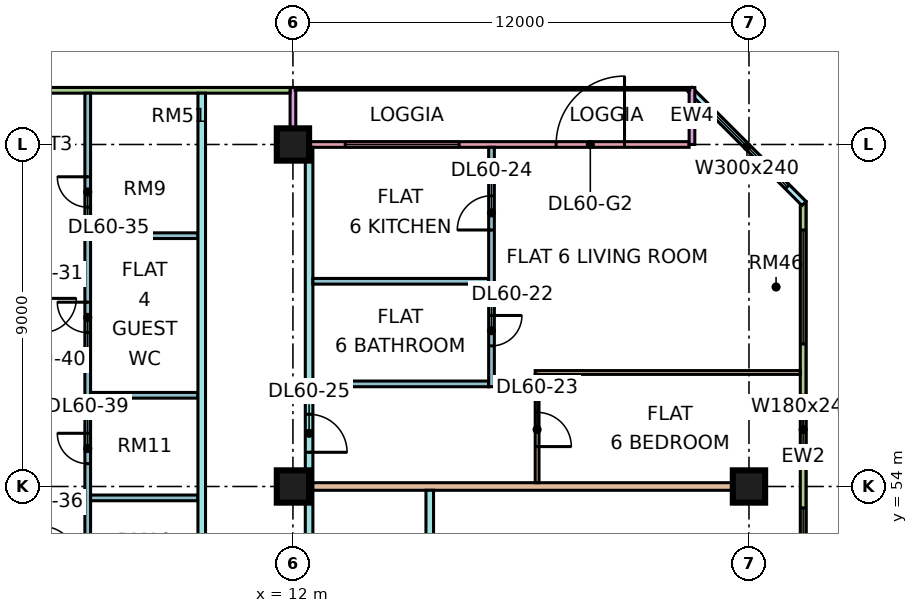
"""IFC4 building model, lengths in metres.
Left out: names, types, materials, properties, quantities, classifications, styles, units other than length and angle.
Written with IfcOpenShell. Run it as: python <this file> out.ifc"""

import sys

from ifc_helpers import new_model, si_unit, direction, frame, frame_2d, origin, origin_2d, place, context, subcontext, project, spatial, rectangle, extrude, element, fill, save


model = new_model("IFC4")
c1 = context("Model", 3, precision=1e-05, world=origin(), true_north=direction((0.0, 1.0)))
c2 = subcontext(c1, "Body", "Model", "MODEL_VIEW")
j1 = project(units=[si_unit("LENGTHUNIT", "METRE"), si_unit("PLANEANGLEUNIT", "RADIAN")], contexts=[c1])
p1 = place(None, origin())
s1 = spatial("IfcSite", under=j1, at=p1, CompositionType="ELEMENT")
p2 = place(p1, origin())
s2 = spatial("IfcBuilding", under=s1, at=p2, CompositionType="ELEMENT")
p3 = place(p2, frame((0.0, 0.0, 252.9)))
s3 = spatial("IfcBuildingStorey", under=s2, at=p3, CompositionType="ELEMENT", Elevation=252.9)
for number, where, z_axis, x_axis in (
    (1, (12.0, 54.0, 0.0), (0.0, 0.0, 1.0), (1.0, 0.0, 0.0)),
    (2, (12.0, 63.0, 0.0), (0.0, 0.0, 1.0), (1.0, 0.0, 0.0)),
    (3, (24.0, 54.0, 0.0), (0.0, 0.0, 1.0), (1.0, 0.0, 0.0)),
):
    element("IfcColumn", number, at=place(p3, frame(where, z_axis=z_axis, x_axis=x_axis)), inside=s3, PredefinedType="COLUMN", context=c2, shape_type="SweptSolid", body=[
        extrude(rectangle(XDim=0.85, YDim=0.85, at=origin_2d()), origin(), (0.0, 0.0, 1.0), 3.75),
    ])
p4 = place(p3, frame((25.425, 48.075, 0.0), z_axis=(0.0, 0.0, 1.0), x_axis=(0.0, 1.0, 0.0)))
e4 = element("IfcWall", 4, at=p4, inside=s3, PredefinedType="SOLIDWALL", context=c2, shape_type="SweptSolid", body=[
    extrude(rectangle(XDim=13.425, YDim=0.15, at=frame_2d((6.712, 0.0))), origin(), (0.0, 0.0, 1.0), 3.3),
])
p5 = place(p4, frame((0.562, 0.0, 0.45)))
e5 = element("IfcOpeningElement", 5, at=p5, cuts=e4, PredefinedType="OPENING", context=c2, shape_type="SweptSolid", body=[
    extrude(rectangle(XDim=4.8, YDim=2.4, at=frame_2d((2.4, 1.2))), frame((0.0, 0.085, 0.0), z_axis=(0.0, -1.0, 0.0), x_axis=(1.0, 0.0, 0.0)), (0.0, 0.0, 1.0), 0.17),
])
p6 = place(p4, frame((6.525, 0.0, 0.45)))
e6 = element("IfcOpeningElement", 6, at=p6, cuts=e4, PredefinedType="OPENING", context=c2, shape_type="SweptSolid", body=[
    extrude(rectangle(XDim=1.8, YDim=2.4, at=frame_2d((0.9, 1.2))), frame((0.0, 0.085, 0.0), z_axis=(0.0, -1.0, 0.0), x_axis=(1.0, 0.0, 0.0)), (0.0, 0.0, 1.0), 0.17),
])
p7 = place(p4, frame((9.675, 0.0, 0.45)))
e7 = element("IfcOpeningElement", 7, at=p7, cuts=e4, PredefinedType="OPENING", context=c2, shape_type="SweptSolid", body=[
    extrude(rectangle(XDim=3.0, YDim=2.4, at=frame_2d((1.5, 1.2))), frame((0.0, 0.085, 0.0), z_axis=(0.0, -1.0, 0.0), x_axis=(1.0, 0.0, 0.0)), (0.0, 0.0, 1.0), 0.17),
])
p8 = place(p3, frame((25.447, 61.447, 0.0), z_axis=(0.0, 0.0, 1.0), x_axis=(-0.707106781187, 0.707106781187, 0.0)))
e8 = element("IfcWall", 8, at=p8, inside=s3, PredefinedType="SOLIDWALL", context=c2, shape_type="SweptSolid", body=[
    extrude(rectangle(XDim=4.243, YDim=0.15, at=frame_2d((2.121, 0.0))), origin(), (0.0, 0.0, 1.0), 3.3),
])
p9 = place(p8, frame((0.621, 0.0, 0.45)))
e9 = element("IfcOpeningElement", 9, at=p9, cuts=e8, PredefinedType="OPENING", context=c2, shape_type="SweptSolid", body=[
    extrude(rectangle(XDim=3.0, YDim=2.4, at=frame_2d((1.5, 1.2))), frame((0.0, 0.085, 0.0), z_axis=(0.0, -1.0, 0.0), x_axis=(1.0, 0.0, 0.0)), (0.0, 0.0, 1.0), 0.17),
])
p10 = place(p3, frame((22.425, 63.0, 0.0), z_axis=(0.0, 0.0, 1.0), x_axis=(-1.0, 0.0, 0.0)))
e10 = element("IfcWall", 10, at=p10, inside=s3, PredefinedType="SOLIDWALL", context=c2, shape_type="SweptSolid", body=[
    extrude(rectangle(XDim=10.35, YDim=0.15, at=frame_2d((5.175, 0.0))), origin(), (0.0, 0.0, 1.0), 3.3),
])
p11 = place(p10, frame((1.7, 0.0, 0.0)))
e11 = element("IfcOpeningElement", 11, at=p11, cuts=e10, PredefinedType="OPENING", context=c2, shape_type="SweptSolid", body=[
    extrude(rectangle(XDim=1.8, YDim=2.4, at=frame_2d((0.9, 1.2))), frame((0.0, 0.085, 0.0), z_axis=(0.0, -1.0, 0.0), x_axis=(1.0, 0.0, 0.0)), (0.0, 0.0, 1.0), 0.17),
])
p12 = place(p10, frame((6.05, 0.0, 0.45)))
e12 = element("IfcOpeningElement", 12, at=p12, cuts=e10, PredefinedType="OPENING", context=c2, shape_type="SweptSolid", body=[
    extrude(rectangle(XDim=3.0, YDim=2.4, at=frame_2d((1.5, 1.2))), frame((0.0, 0.085, 0.0), z_axis=(0.0, -1.0, 0.0), x_axis=(1.0, 0.0, 0.0)), (0.0, 0.0, 1.0), 0.17),
])
for number, where, z_axis, x_axis in (
    (13, (22.5, 64.5, 0.0), (0.0, 0.0, 1.0), (0.0, -1.0, 0.0)),
    (14, (12.0, 64.5, 0.0), (0.0, 0.0, 1.0), (0.0, -1.0, 0.0)),
):
    element("IfcWall", number, at=place(p3, frame(where, z_axis=z_axis, x_axis=x_axis)), inside=s3, PredefinedType="SOLIDWALL", context=c2, shape_type="SweptSolid", body=[
        extrude(rectangle(XDim=1.5, YDim=0.15, at=frame_2d((0.75, 0.0))), origin(), (0.0, 0.0, 1.0), 3.3),
    ])
p13 = place(p3, frame((11.925, 64.425, 0.0), z_axis=(0.0, 0.0, 1.0), x_axis=(-1.0, 0.0, 0.0)))
e15 = element("IfcWall", 15, at=p13, inside=s3, PredefinedType="SOLIDWALL", context=c2, shape_type="SweptSolid", body=[
    extrude(rectangle(XDim=10.425, YDim=0.15, at=frame_2d((5.212, 0.0))), origin(), (0.0, 0.0, 1.0), 3.3),
])
p14 = place(p13, frame((6.675, 0.0, 0.45)))
e16 = element("IfcOpeningElement", 16, at=p14, cuts=e15, PredefinedType="OPENING", context=c2, shape_type="SweptSolid", body=[
    extrude(rectangle(XDim=3.0, YDim=2.4, at=frame_2d((1.5, 1.2))), frame((0.0, 0.085, 0.0), z_axis=(0.0, -1.0, 0.0), x_axis=(1.0, 0.0, 0.0)), (0.0, 0.0, 1.0), 0.17),
])
p15 = place(p3, frame((5.45, 63.0, 0.0), z_axis=(0.0, 0.0, 1.0), x_axis=(1.0, 0.0, 0.0)))
e17 = element("IfcWall", 17, at=p15, inside=s3, PredefinedType="PARTITIONING", context=c2, shape_type="SweptSolid", body=[
    extrude(rectangle(XDim=0.55, YDim=0.1, at=frame_2d((0.275, 0.0))), origin(), (0.0, 0.0, 1.0), 3.3),
])
p16 = place(p3, frame((6.6, 50.35, 0.0), z_axis=(0.0, 0.0, 1.0), x_axis=(0.0, 1.0, 0.0)))
e18 = element("IfcWall", 18, at=p16, inside=s3, PredefinedType="PARTITIONING", context=c2, shape_type="SweptSolid", body=[
    extrude(rectangle(XDim=14.0, YDim=0.15, at=frame_2d((7.0, 0.0))), origin(), (0.0, 0.0, 1.0), 3.3),
])
p17 = place(p16, frame((11.0, 0.0, 0.0)))
e19 = element("IfcOpeningElement", 19, at=p17, cuts=e18, PredefinedType="OPENING", context=c2, shape_type="SweptSolid", body=[
    extrude(rectangle(XDim=0.8, YDim=2.1, at=frame_2d((0.4, 1.05))), frame((0.0, 0.085, 0.0), z_axis=(0.0, -1.0, 0.0), x_axis=(1.0, 0.0, 0.0)), (0.0, 0.0, 1.0), 0.17),
])
p18 = place(p16, frame((4.25, 0.0, 0.0)))
e20 = element("IfcOpeningElement", 20, at=p18, cuts=e18, PredefinedType="OPENING", context=c2, shape_type="SweptSolid", body=[
    extrude(rectangle(XDim=0.8, YDim=2.1, at=frame_2d((0.4, 1.05))), frame((0.0, 0.085, 0.0), z_axis=(0.0, -1.0, 0.0), x_axis=(1.0, 0.0, 0.0)), (0.0, 0.0, 1.0), 0.17),
])
p19 = place(p16, frame((7.7, 0.0, 0.0)))
e21 = element("IfcOpeningElement", 21, at=p19, cuts=e18, PredefinedType="OPENING", context=c2, shape_type="SweptSolid", body=[
    extrude(rectangle(XDim=0.8, YDim=2.1, at=frame_2d((0.4, 1.05))), frame((0.0, 0.085, 0.0), z_axis=(0.0, -1.0, 0.0), x_axis=(1.0, 0.0, 0.0)), (0.0, 0.0, 1.0), 0.17),
])
for number, where, z_axis, x_axis in (
    (22, (6.675, 53.7, 0.0), (0.0, 0.0, 1.0), (1.0, 0.0, 0.0)),
    (23, (6.675, 56.4, 0.0), (0.0, 0.0, 1.0), (1.0, 0.0, 0.0)),
    (24, (6.675, 60.6, 0.0), (0.0, 0.0, 1.0), (1.0, 0.0, 0.0)),
):
    element("IfcWall", number, at=place(p3, frame(where, z_axis=z_axis, x_axis=x_axis)), inside=s3, PredefinedType="PARTITIONING", context=c2, shape_type="SweptSolid", body=[
        extrude(rectangle(XDim=2.825, YDim=0.15, at=frame_2d((1.413, 0.0))), origin(), (0.0, 0.0, 1.0), 3.3),
    ])
p20 = place(p3, frame((9.6, 20.0, 0.0), z_axis=(0.0, 0.0, 1.0), x_axis=(0.0, 1.0, 0.0)))
e25 = element("IfcWall", 25, at=p20, inside=s3, PredefinedType="PARTITIONING", context=c2, shape_type="SweptSolid", body=[
    extrude(rectangle(XDim=44.35, YDim=0.2, at=frame_2d((22.175, 0.0))), origin(), (0.0, 0.0, 1.0), 3.3),
])
p21 = place(p20, frame((28.8, 0.0, 0.0)))
e26 = element("IfcOpeningElement", 26, at=p21, cuts=e25, PredefinedType="OPENING", context=c2, shape_type="SweptSolid", body=[
    extrude(rectangle(XDim=1.0, YDim=2.1, at=frame_2d((0.5, 1.05))), frame((0.0, 0.11, 0.0), z_axis=(0.0, -1.0, 0.0), x_axis=(1.0, 0.0, 0.0)), (0.0, 0.0, 1.0), 0.22),
])
p22 = place(p20, frame((0.6, 0.0, 0.0)))
e27 = element("IfcOpeningElement", 27, at=p22, cuts=e25, PredefinedType="OPENING", context=c2, shape_type="SweptSolid", body=[
    extrude(rectangle(XDim=1.2, YDim=2.1, at=frame_2d((0.6, 1.05))), frame((0.0, 0.11, 0.0), z_axis=(0.0, -1.0, 0.0), x_axis=(1.0, 0.0, 0.0)), (0.0, 0.0, 1.0), 0.22),
])
p23 = place(p20, frame((3.9, 0.0, 0.0)))
e28 = element("IfcOpeningElement", 28, at=p23, cuts=e25, PredefinedType="OPENING", context=c2, shape_type="SweptSolid", body=[
    extrude(rectangle(XDim=1.0, YDim=2.1, at=frame_2d((0.5, 1.05))), frame((0.0, 0.11, 0.0), z_axis=(0.0, -1.0, 0.0), x_axis=(1.0, 0.0, 0.0)), (0.0, 0.0, 1.0), 0.22),
])
p24 = place(p3, frame((12.425, 20.0, 0.0), z_axis=(0.0, 0.0, 1.0), x_axis=(0.0, 1.0, 0.0)))
e29 = element("IfcWall", 29, at=p24, inside=s3, PredefinedType="PARTITIONING", context=c2, shape_type="SweptSolid", body=[
    extrude(rectangle(XDim=42.926, YDim=0.2, at=frame_2d((21.463, 0.0))), origin(), (0.0, 0.0, 1.0), 3.3),
])
p25 = place(p24, frame((7.0, 0.0, 0.0)))
e30 = element("IfcOpeningElement", 30, at=p25, cuts=e29, PredefinedType="OPENING", context=c2, shape_type="SweptSolid", body=[
    extrude(rectangle(XDim=1.0, YDim=2.1, at=frame_2d((0.5, 1.05))), frame((0.0, 0.11, 0.0), z_axis=(0.0, -1.0, 0.0), x_axis=(1.0, 0.0, 0.0)), (0.0, 0.0, 1.0), 0.22),
])
p26 = place(p24, frame((12.95, 0.0, 0.0)))
e31 = element("IfcOpeningElement", 31, at=p26, cuts=e29, PredefinedType="OPENING", context=c2, shape_type="SweptSolid", body=[
    extrude(rectangle(XDim=1.0, YDim=2.1, at=frame_2d((0.5, 1.05))), frame((0.0, 0.11, 0.0), z_axis=(0.0, -1.0, 0.0), x_axis=(1.0, 0.0, 0.0)), (0.0, 0.0, 1.0), 0.22),
])
p27 = place(p24, frame((16.75, 0.0, 0.0)))
e32 = element("IfcOpeningElement", 32, at=p27, cuts=e29, PredefinedType="OPENING", context=c2, shape_type="SweptSolid", body=[
    extrude(rectangle(XDim=1.0, YDim=2.1, at=frame_2d((0.5, 1.05))), frame((0.0, 0.11, 0.0), z_axis=(0.0, -1.0, 0.0), x_axis=(1.0, 0.0, 0.0)), (0.0, 0.0, 1.0), 0.22),
])
p28 = place(p24, frame((34.9, 0.0, 0.0)))
e33 = element("IfcOpeningElement", 33, at=p28, cuts=e29, PredefinedType="OPENING", context=c2, shape_type="SweptSolid", body=[
    extrude(rectangle(XDim=1.0, YDim=2.1, at=frame_2d((0.5, 1.05))), frame((0.0, 0.11, 0.0), z_axis=(0.0, -1.0, 0.0), x_axis=(1.0, 0.0, 0.0)), (0.0, 0.0, 1.0), 0.22),
])
p29 = place(p24, frame((1.15, 0.0, 0.0)))
e34 = element("IfcOpeningElement", 34, at=p29, cuts=e29, PredefinedType="OPENING", context=c2, shape_type="SweptSolid", body=[
    extrude(rectangle(XDim=1.8, YDim=2.1, at=frame_2d((0.9, 1.05))), frame((0.0, 0.11, 0.0), z_axis=(0.0, -1.0, 0.0), x_axis=(1.0, 0.0, 0.0)), (0.0, 0.0, 1.0), 0.22),
])
p30 = place(p24, frame((28.6, 0.0, 0.0)))
e35 = element("IfcOpeningElement", 35, at=p30, cuts=e29, PredefinedType="OPENING", context=c2, shape_type="SweptSolid", body=[
    extrude(rectangle(XDim=1.8, YDim=2.1, at=frame_2d((0.9, 1.05))), frame((0.0, 0.11, 0.0), z_axis=(0.0, -1.0, 0.0), x_axis=(1.0, 0.0, 0.0)), (0.0, 0.0, 1.0), 0.22),
])
p31 = place(p3, frame((12.525, 54.0, 0.0), z_axis=(0.0, 0.0, 1.0), x_axis=(1.0, 0.0, 0.0)))
e36 = element("IfcWall", 36, at=p31, inside=s3, PredefinedType="PARTITIONING", context=c2, shape_type="SweptSolid", body=[
    extrude(rectangle(XDim=11.475, YDim=0.2, at=frame_2d((5.738, 0.0))), origin(), (0.0, 0.0, 1.0), 3.3),
])
for number, where, z_axis, x_axis in (
    (37, (12.525, 56.7, 0.0), (0.0, 0.0, 1.0), (1.0, 0.0, 0.0)),
    (38, (12.525, 59.4, 0.0), (0.0, 0.0, 1.0), (1.0, 0.0, 0.0)),
):
    element("IfcWall", number, at=place(p3, frame(where, z_axis=z_axis, x_axis=x_axis)), inside=s3, PredefinedType="PARTITIONING", context=c2, shape_type="SweptSolid", body=[
        extrude(rectangle(XDim=4.625, YDim=0.15, at=frame_2d((2.312, 0.0))), origin(), (0.0, 0.0, 1.0), 3.3),
    ])
p32 = place(p3, frame((15.6, 51.225, 0.0), z_axis=(0.0, 0.0, 1.0), x_axis=(0.0, 1.0, 0.0)))
e39 = element("IfcWall", 39, at=p32, inside=s3, PredefinedType="PARTITIONING", context=c2, shape_type="SweptSolid", body=[
    extrude(rectangle(XDim=2.675, YDim=0.2, at=frame_2d((1.337, 0.0))), origin(), (0.0, 0.0, 1.0), 3.3),
])
p33 = place(p3, frame((17.225, 56.625, 0.0), z_axis=(0.0, 0.0, 1.0), x_axis=(0.0, 1.0, 0.0)))
e40 = element("IfcWall", 40, at=p33, inside=s3, PredefinedType="PARTITIONING", context=c2, shape_type="SweptSolid", body=[
    extrude(rectangle(XDim=6.301, YDim=0.15, at=frame_2d((3.15, 0.0))), origin(), (0.0, 0.0, 1.0), 3.3),
])
p34 = place(p33, frame((1.075, 0.0, 0.0)))
e41 = element("IfcOpeningElement", 41, at=p34, cuts=e40, PredefinedType="OPENING", context=c2, shape_type="SweptSolid", body=[
    extrude(rectangle(XDim=0.8, YDim=2.1, at=frame_2d((0.4, 1.05))), frame((0.0, 0.085, 0.0), z_axis=(0.0, -1.0, 0.0), x_axis=(1.0, 0.0, 0.0)), (0.0, 0.0, 1.0), 0.17),
])
p35 = place(p33, frame((4.125, 0.0, 0.0)))
e42 = element("IfcOpeningElement", 42, at=p35, cuts=e40, PredefinedType="OPENING", context=c2, shape_type="SweptSolid", body=[
    extrude(rectangle(XDim=0.9, YDim=2.1, at=frame_2d((0.45, 1.05))), frame((0.0, 0.085, 0.0), z_axis=(0.0, -1.0, 0.0), x_axis=(1.0, 0.0, 0.0)), (0.0, 0.0, 1.0), 0.17),
])
p36 = place(p3, frame((18.375, 57.0, 0.0), z_axis=(0.0, 0.0, 1.0), x_axis=(1.0, 0.0, 0.0)))
e43 = element("IfcWall", 43, at=p36, inside=s3, PredefinedType="PARTITIONING", context=c2, shape_type="SweptSolid", body=[
    extrude(rectangle(XDim=6.975, YDim=0.1, at=frame_2d((3.488, 0.0))), origin(), (0.0, 0.0, 1.0), 3.3),
])
p37 = place(p3, frame((18.425, 54.1, 0.0), z_axis=(0.0, 0.0, 1.0), x_axis=(0.0, 1.0, 0.0)))
e44 = element("IfcWall", 44, at=p37, inside=s3, PredefinedType="PARTITIONING", context=c2, shape_type="SweptSolid", body=[
    extrude(rectangle(XDim=2.85, YDim=0.1, at=frame_2d((1.425, 0.0))), origin(), (0.0, 0.0, 1.0), 3.3),
])
p38 = place(p37, frame((0.95, 0.0, 0.0)))
e45 = element("IfcOpeningElement", 45, at=p38, cuts=e44, PredefinedType="OPENING", context=c2, shape_type="SweptSolid", body=[
    extrude(rectangle(XDim=0.9, YDim=2.1, at=frame_2d((0.45, 1.05))), frame((0.0, 0.06, 0.0), z_axis=(0.0, -1.0, 0.0), x_axis=(1.0, 0.0, 0.0)), (0.0, 0.0, 1.0), 0.12),
])
p39 = place(p5, origin())
e46 = element("IfcWindow", 46, at=p39, inside=s3, PartitioningType="SINGLE_PANEL", PredefinedType="WINDOW", context=c2, shape_type="SweptSolid", body=[
    extrude(rectangle(XDim=4.8, YDim=2.4, at=frame_2d((2.4, 1.2))), frame((0.0, 0.03, 0.0), z_axis=(0.0, -1.0, 0.0), x_axis=(1.0, 0.0, 0.0)), (0.0, 0.0, 1.0), 0.06),
])
fill(e5, e46)
p40 = place(p6, origin())
e47 = element("IfcWindow", 47, at=p40, inside=s3, PartitioningType="SINGLE_PANEL", PredefinedType="WINDOW", context=c2, shape_type="SweptSolid", body=[
    extrude(rectangle(XDim=1.8, YDim=2.4, at=frame_2d((0.9, 1.2))), frame((0.0, 0.03, 0.0), z_axis=(0.0, -1.0, 0.0), x_axis=(1.0, 0.0, 0.0)), (0.0, 0.0, 1.0), 0.06),
])
fill(e6, e47)
p41 = place(p7, origin())
e48 = element("IfcWindow", 48, at=p41, inside=s3, PartitioningType="SINGLE_PANEL", PredefinedType="WINDOW", context=c2, shape_type="SweptSolid", body=[
    extrude(rectangle(XDim=3.0, YDim=2.4, at=frame_2d((1.5, 1.2))), frame((0.0, 0.03, 0.0), z_axis=(0.0, -1.0, 0.0), x_axis=(1.0, 0.0, 0.0)), (0.0, 0.0, 1.0), 0.06),
])
fill(e7, e48)
p42 = place(p9, origin())
e49 = element("IfcWindow", 49, at=p42, inside=s3, PartitioningType="SINGLE_PANEL", PredefinedType="WINDOW", context=c2, shape_type="SweptSolid", body=[
    extrude(rectangle(XDim=3.0, YDim=2.4, at=frame_2d((1.5, 1.2))), frame((0.0, 0.03, 0.0), z_axis=(0.0, -1.0, 0.0), x_axis=(1.0, 0.0, 0.0)), (0.0, 0.0, 1.0), 0.06),
])
fill(e9, e49)
p43 = place(p11, frame((1.8, 0.0, 0.0), z_axis=(0.0, 0.0, 1.0), x_axis=(-1.0, 0.0, 0.0)))
e50 = element("IfcDoor", 50, at=p43, inside=s3, OperationType="DOUBLE_DOOR_SINGLE_SWING", PredefinedType="DOOR", context=c2, shape_type="SweptSolid", body=[
    extrude(rectangle(XDim=1.8, YDim=2.4, at=frame_2d((0.9, 1.2))), frame((0.0, 0.025, 0.0), z_axis=(0.0, -1.0, 0.0), x_axis=(1.0, 0.0, 0.0)), (0.0, 0.0, 1.0), 0.05),
])
fill(e11, e50)
p44 = place(p12, origin())
e51 = element("IfcWindow", 51, at=p44, inside=s3, PartitioningType="SINGLE_PANEL", PredefinedType="WINDOW", context=c2, shape_type="SweptSolid", body=[
    extrude(rectangle(XDim=3.0, YDim=2.4, at=frame_2d((1.5, 1.2))), frame((0.0, 0.03, 0.0), z_axis=(0.0, -1.0, 0.0), x_axis=(1.0, 0.0, 0.0)), (0.0, 0.0, 1.0), 0.06),
])
fill(e12, e51)
p45 = place(p34, origin())
e52 = element("IfcDoor", 52, at=p45, inside=s3, OperationType="SINGLE_SWING_RIGHT", PredefinedType="DOOR", context=c2, shape_type="SweptSolid", body=[
    extrude(rectangle(XDim=0.8, YDim=2.1, at=frame_2d((0.4, 1.05))), frame((0.0, 0.025, 0.0), z_axis=(0.0, -1.0, 0.0), x_axis=(1.0, 0.0, 0.0)), (0.0, 0.0, 1.0), 0.05),
])
fill(e41, e52)
p46 = place(p38, frame((0.9, 0.0, 0.0), z_axis=(0.0, 0.0, 1.0), x_axis=(-1.0, 0.0, 0.0)))
e53 = element("IfcDoor", 53, at=p46, inside=s3, OperationType="SINGLE_SWING_LEFT", PredefinedType="DOOR", context=c2, shape_type="SweptSolid", body=[
    extrude(rectangle(XDim=0.9, YDim=2.1, at=frame_2d((0.45, 1.05))), frame((0.0, 0.025, 0.0), z_axis=(0.0, -1.0, 0.0), x_axis=(1.0, 0.0, 0.0)), (0.0, 0.0, 1.0), 0.05),
])
fill(e45, e53)
p47 = place(p35, origin())
e54 = element("IfcDoor", 54, at=p47, inside=s3, OperationType="SINGLE_SWING_LEFT", PredefinedType="DOOR", context=c2, shape_type="SweptSolid", body=[
    extrude(rectangle(XDim=0.9, YDim=2.1, at=frame_2d((0.45, 1.05))), frame((0.0, 0.025, 0.0), z_axis=(0.0, -1.0, 0.0), x_axis=(1.0, 0.0, 0.0)), (0.0, 0.0, 1.0), 0.05),
])
fill(e42, e54)
p48 = place(p28, frame((1.0, 0.0, 0.0), z_axis=(0.0, 0.0, 1.0), x_axis=(-1.0, 0.0, 0.0)))
e55 = element("IfcDoor", 55, at=p48, inside=s3, OperationType="SINGLE_SWING_LEFT", PredefinedType="DOOR", context=c2, shape_type="SweptSolid", body=[
    extrude(rectangle(XDim=1.0, YDim=2.1, at=frame_2d((0.5, 1.05))), frame((0.0, 0.025, 0.0), z_axis=(0.0, -1.0, 0.0), x_axis=(1.0, 0.0, 0.0)), (0.0, 0.0, 1.0), 0.05),
])
fill(e33, e55)
p49 = place(p17, frame((0.8, 0.0, 0.0), z_axis=(0.0, 0.0, 1.0), x_axis=(-1.0, 0.0, 0.0)))
e56 = element("IfcDoor", 56, at=p49, inside=s3, OperationType="SINGLE_SWING_RIGHT", PredefinedType="DOOR", context=c2, shape_type="SweptSolid", body=[
    extrude(rectangle(XDim=0.8, YDim=2.1, at=frame_2d((0.4, 1.05))), frame((0.0, 0.025, 0.0), z_axis=(0.0, -1.0, 0.0), x_axis=(1.0, 0.0, 0.0)), (0.0, 0.0, 1.0), 0.05),
])
fill(e19, e56)
p50 = place(p18, frame((0.8, 0.0, 0.0), z_axis=(0.0, 0.0, 1.0), x_axis=(-1.0, 0.0, 0.0)))
e57 = element("IfcDoor", 57, at=p50, inside=s3, OperationType="SINGLE_SWING_RIGHT", PredefinedType="DOOR", context=c2, shape_type="SweptSolid", body=[
    extrude(rectangle(XDim=0.8, YDim=2.1, at=frame_2d((0.4, 1.05))), frame((0.0, 0.025, 0.0), z_axis=(0.0, -1.0, 0.0), x_axis=(1.0, 0.0, 0.0)), (0.0, 0.0, 1.0), 0.05),
])
fill(e20, e57)
p51 = place(p19, frame((0.8, 0.0, 0.0), z_axis=(0.0, 0.0, 1.0), x_axis=(-1.0, 0.0, 0.0)))
e58 = element("IfcDoor", 58, at=p51, inside=s3, OperationType="SINGLE_SWING_RIGHT", PredefinedType="DOOR", context=c2, shape_type="SweptSolid", body=[
    extrude(rectangle(XDim=0.8, YDim=2.1, at=frame_2d((0.4, 1.05))), frame((0.0, 0.025, 0.0), z_axis=(0.0, -1.0, 0.0), x_axis=(1.0, 0.0, 0.0)), (0.0, 0.0, 1.0), 0.05),
])
fill(e21, e58)
save(model, sys.argv[1])
